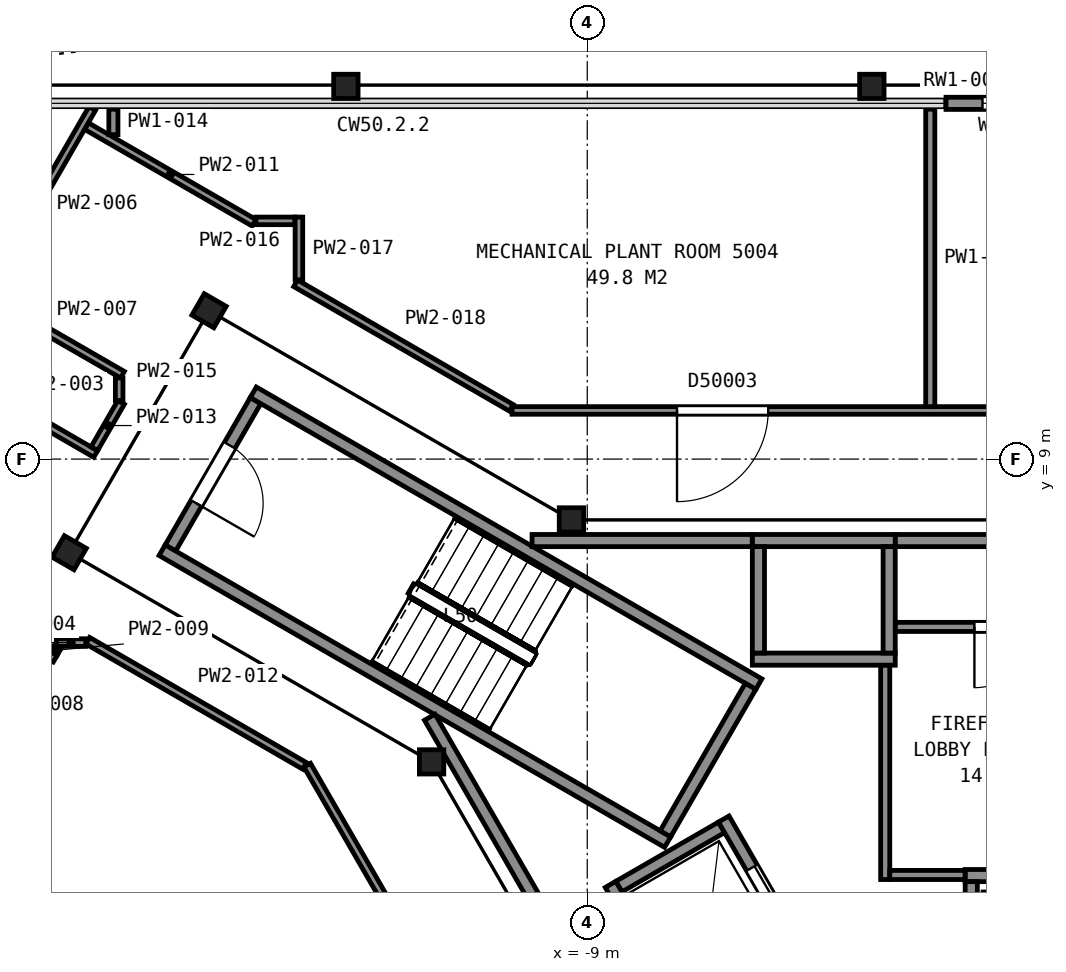
"""IFC4 building model, lengths in metres.
Left out: names, types, materials, properties, quantities, classifications, styles, units other than length and angle.
Written with IfcOpenShell. Run it as: python <this file> out.ifc"""

import sys

from ifc_helpers import new_model, si_unit, direction, frame, frame_2d, origin, origin_2d, place, context, subcontext, project, spatial, rectangle, i_section, extrude, element, fill, save


model = new_model("IFC4")
c1 = context("Model", 3, precision=1e-05, world=origin(), true_north=direction((0.0, 1.0)))
c2 = subcontext(c1, "Body", "Model", "MODEL_VIEW")
j1 = project(units=[si_unit("LENGTHUNIT", "METRE"), si_unit("PLANEANGLEUNIT", "RADIAN")], contexts=[c1])
p1 = place(None, origin())
s1 = spatial("IfcSite", under=j1, at=p1, CompositionType="ELEMENT")
p2 = place(p1, origin())
s2 = spatial("IfcBuilding", under=s1, at=p2, CompositionType="ELEMENT")
p3 = place(p2, frame((0.0, 0.0, 200.6)))
s3 = spatial("IfcBuildingStorey", under=s2, at=p3, CompositionType="ELEMENT", Elevation=200.6)
for number, where, z_axis, x_axis in (
    (1, (-4.32, 15.13, -0.16), (0.0, 0.0, 1.0), (1.0, 0.0, 0.0)),
    (2, (-12.97, 15.13, -0.16), (0.0, 0.0, 1.0), (1.0, 0.0, 0.0)),
):
    element("IfcColumn", number, at=place(p3, frame(where, z_axis=z_axis, x_axis=x_axis)), inside=s3, PredefinedType="COLUMN", context=c2, shape_type="SweptSolid", body=[
        extrude(i_section(OverallWidth=0.401, OverallDepth=0.399, WebThickness=0.025, FlangeThickness=0.04, FilletRadius=0.015, at=origin_2d()), origin(), (0.0, 0.0, 1.0), 5.96),
    ])
p4 = place(p3, frame((-9.26, 8.0, 0.0), z_axis=(0.0, 0.0, 1.0), x_axis=(1.0, 0.0, 0.0)))
e3 = element("IfcColumn", 3, at=p4, inside=s3, PredefinedType="COLUMN", context=c2, shape_type="SweptSolid", body=[
    extrude(i_section(OverallWidth=0.401, OverallDepth=0.399, WebThickness=0.025, FlangeThickness=0.04, FilletRadius=0.015, at=origin_2d()), origin(), (0.0, 0.0, 1.0), 5.8),
])
for number, where, z_axis, x_axis in (
    (4, (-15.22, 11.44, 0.0), (0.0, 0.0, 1.0), (0.5, 0.866, 0.0)),
    (5, (-17.52, 7.46, 0.0), (0.0, 0.0, 1.0), (0.5, 0.866, 0.0)),
):
    element("IfcColumn", number, at=place(p3, frame(where, z_axis=z_axis, x_axis=x_axis)), inside=s3, PredefinedType="COLUMN", context=c2, shape_type="SweptSolid", body=[
        extrude(i_section(OverallWidth=0.406, OverallDepth=0.417, WebThickness=0.03, FlangeThickness=0.048, FilletRadius=0.015, at=origin_2d()), origin(), (0.0, 0.0, 1.0), 5.8),
    ])
p5 = place(p3, frame((-11.56, 4.02, 0.0), z_axis=(0.0, 0.0, 1.0), x_axis=(1.0, 0.0, 0.0)))
e6 = element("IfcColumn", 6, at=p5, inside=s3, PredefinedType="COLUMN", context=c2, shape_type="SweptSolid", body=[
    extrude(i_section(OverallWidth=0.401, OverallDepth=0.399, WebThickness=0.025, FlangeThickness=0.04, FilletRadius=0.015, at=origin_2d()), origin(), (0.0, 0.0, 1.0), 5.8),
])
p6 = place(p3, frame((3.1, 14.851, 0.0), z_axis=(0.0, 0.0, 1.0), x_axis=(-1.0, 0.0, 0.0)))
e7 = element("IfcWall", 7, at=p6, inside=s3, PredefinedType="SOLIDWALL", context=c2, shape_type="SweptSolid", body=[
    extrude(rectangle(XDim=6.2, YDim=0.2, at=frame_2d((3.1, 0.0))), origin(), (0.0, 0.0, 1.0), 4.522),
])
p7 = place(p6, frame((0.6, 0.0, 0.9)))
e8 = element("IfcOpeningElement", 8, at=p7, cuts=e7, PredefinedType="OPENING", context=c2, shape_type="SweptSolid", body=[
    extrude(rectangle(XDim=1.0, YDim=1.5, at=frame_2d((0.5, 0.75))), frame((0.0, 0.11, 0.0), z_axis=(0.0, -1.0, 0.0), x_axis=(1.0, 0.0, 0.0)), (0.0, 0.0, 1.0), 0.22),
])
p8 = place(p6, frame((2.2, 0.0, 0.0)))
e9 = element("IfcOpeningElement", 9, at=p8, cuts=e7, PredefinedType="OPENING", context=c2, shape_type="SweptSolid", body=[
    extrude(rectangle(XDim=1.8, YDim=2.4, at=frame_2d((0.9, 1.2))), frame((0.0, 0.11, 0.0), z_axis=(0.0, -1.0, 0.0), x_axis=(1.0, 0.0, 0.0)), (0.0, 0.0, 1.0), 0.22),
])
p9 = place(p6, frame((4.6, 0.0, 0.9)))
e10 = element("IfcOpeningElement", 10, at=p9, cuts=e7, PredefinedType="OPENING", context=c2, shape_type="SweptSolid", body=[
    extrude(rectangle(XDim=1.0, YDim=1.5, at=frame_2d((0.5, 0.75))), frame((0.0, 0.11, 0.0), z_axis=(0.0, -1.0, 0.0), x_axis=(1.0, 0.0, 0.0)), (0.0, 0.0, 1.0), 0.22),
])
p10 = place(p3, frame((-18.708, 2.701, 0.0), z_axis=(0.0, 0.0, 1.0), x_axis=(0.500009909098, -0.866019682689, 0.0)))
e11 = element("IfcWall", 11, at=p10, inside=s3, PredefinedType="SOLIDWALL", context=c2, shape_type="SweptSolid", body=[
    extrude(rectangle(XDim=6.2, YDim=0.2, at=frame_2d((3.1, 0.0))), origin(), (0.0, 0.0, 1.0), 4.522),
])
p11 = place(p10, frame((0.6, 0.0, 0.9)))
e12 = element("IfcOpeningElement", 12, at=p11, cuts=e11, PredefinedType="OPENING", context=c2, shape_type="SweptSolid", body=[
    extrude(rectangle(XDim=1.0, YDim=1.5, at=frame_2d((0.5, 0.75))), frame((0.0, 0.11, 0.0), z_axis=(0.0, -1.0, 0.0), x_axis=(1.0, 0.0, 0.0)), (0.0, 0.0, 1.0), 0.22),
])
p12 = place(p10, frame((2.2, 0.0, 0.0)))
e13 = element("IfcOpeningElement", 13, at=p12, cuts=e11, PredefinedType="OPENING", context=c2, shape_type="SweptSolid", body=[
    extrude(rectangle(XDim=1.8, YDim=2.4, at=frame_2d((0.9, 1.2))), frame((0.0, 0.11, 0.0), z_axis=(0.0, -1.0, 0.0), x_axis=(1.0, 0.0, 0.0)), (0.0, 0.0, 1.0), 0.22),
])
p13 = place(p10, frame((4.6, 0.0, 0.9)))
e14 = element("IfcOpeningElement", 14, at=p13, cuts=e11, PredefinedType="OPENING", context=c2, shape_type="SweptSolid", body=[
    extrude(rectangle(XDim=1.0, YDim=1.5, at=frame_2d((0.5, 0.75))), frame((0.0, 0.11, 0.0), z_axis=(0.0, -1.0, 0.0), x_axis=(1.0, 0.0, 0.0)), (0.0, 0.0, 1.0), 0.22),
])
p14 = place(p3, frame((-14.455, 9.962, 0.0), z_axis=(0.0, 0.0, 1.0), x_axis=(-0.500049511043, -0.865996816683, 0.0)))
e15 = element("IfcWall", 15, at=p14, inside=s3, PredefinedType="PARTITIONING", context=c2, shape_type="SweptSolid", body=[
    extrude(rectangle(XDim=2.8, YDim=0.2, at=frame_2d((1.4, 0.0))), origin(), (0.0, 0.0, 1.0), 5.55),
])
p15 = place(p14, frame((0.85, 0.0, 0.0)))
e16 = element("IfcOpeningElement", 16, at=p15, cuts=e15, PredefinedType="OPENING", context=c2, shape_type="SweptSolid", body=[
    extrude(rectangle(XDim=1.1, YDim=2.1, at=frame_2d((0.55, 1.05))), frame((0.0, 0.11, 0.0), z_axis=(0.0, -1.0, 0.0), x_axis=(1.0, 0.0, 0.0)), (0.0, 0.0, 1.0), 0.22),
])
for number, where, z_axis, x_axis in (
    (17, (-7.678, 2.701, 0.0), (0.0, 0.0, 1.0), (-0.866, 0.5, 0.0)),
    (18, (-6.178, 5.299, 0.0), (0.0, 0.0, 1.0), (-0.866, 0.5, 0.0)),
):
    element("IfcWall", number, at=place(p3, frame(where, z_axis=z_axis, x_axis=x_axis)), inside=s3, PredefinedType="PARTITIONING", context=c2, shape_type="SweptSolid", body=[
        extrude(rectangle(XDim=9.6, YDim=0.2, at=frame_2d((4.8, 0.0))), origin(), (0.0, 0.0, 1.0), 5.55),
    ])
p16 = place(p3, frame((-6.315, 5.262, 0.0), z_axis=(0.0, 0.0, 1.0), x_axis=(-0.500049511043, -0.865996816683, 0.0)))
e19 = element("IfcWall", 19, at=p16, inside=s3, PredefinedType="PARTITIONING", context=c2, shape_type="SweptSolid", body=[
    extrude(rectangle(XDim=2.8, YDim=0.2, at=frame_2d((1.4, 0.0))), origin(), (0.0, 0.0, 1.0), 5.55),
])
p17 = place(p3, frame((-2.785, 2.15, 0.0), z_axis=(0.0, 0.0, 1.0), x_axis=(1.0, 0.0, 0.0)))
e20 = element("IfcWall", 20, at=p17, inside=s3, PredefinedType="PARTITIONING", context=c2, shape_type="SweptSolid", body=[
    extrude(rectangle(XDim=2.95, YDim=0.2, at=frame_2d((1.475, 0.0))), origin(), (0.0, 0.0, 1.0), 5.8),
])
p18 = place(p17, frame((0.925, 0.0, 0.0)))
e21 = element("IfcOpeningElement", 21, at=p18, cuts=e20, PredefinedType="OPENING", context=c2, shape_type="SweptSolid", body=[
    extrude(rectangle(XDim=1.1, YDim=2.1, at=frame_2d((0.55, 1.05))), frame((0.0, 0.11, 0.0), z_axis=(0.0, -1.0, 0.0), x_axis=(1.0, 0.0, 0.0)), (0.0, 0.0, 1.0), 0.22),
])
for number, where, z_axis, x_axis in (
    (22, (-6.285, 5.71, 0.0), (0.0, 0.0, 1.0), (1.0, 0.0, 0.0)),
    (23, (-6.285, 7.66, 0.0), (0.0, 0.0, 1.0), (1.0, 0.0, 0.0)),
):
    element("IfcWall", number, at=place(p3, frame(where, z_axis=z_axis, x_axis=x_axis)), inside=s3, PredefinedType="PARTITIONING", context=c2, shape_type="SweptSolid", body=[
        extrude(rectangle(XDim=2.35, YDim=0.2, at=frame_2d((1.175, 0.0))), origin(), (0.0, 0.0, 1.0), 5.8),
    ])
for number, where, z_axis, x_axis in (
    (24, (-8.48, 1.969, 0.0), (0.0, 0.0, 1.0), (0.866, 0.5, 0.0)),
    (25, (-2.685, 0.1, 0.0), (0.0, 0.0, 1.0), (0.0, 1.0, 0.0)),
):
    element("IfcWall", number, at=place(p3, frame(where, z_axis=z_axis, x_axis=x_axis)), inside=s3, PredefinedType="PARTITIONING", context=c2, shape_type="SweptSolid", body=[
        extrude(rectangle(XDim=1.95, YDim=0.2, at=frame_2d((0.975, 0.0))), origin(), (0.0, 0.0, 1.0), 5.8),
    ])
for number, where, z_axis, x_axis in (
    (26, (-4.035, 5.81, 0.0), (0.0, 0.0, 1.0), (0.0, 1.0, 0.0)),
    (27, (-6.185, 5.81, 0.0), (0.0, 0.0, 1.0), (0.0, 1.0, 0.0)),
):
    element("IfcWall", number, at=place(p3, frame(where, z_axis=z_axis, x_axis=x_axis)), inside=s3, PredefinedType="PARTITIONING", context=c2, shape_type="SweptSolid", body=[
        extrude(rectangle(XDim=1.75, YDim=0.2, at=frame_2d((0.875, 0.0))), origin(), (0.0, 0.0, 1.0), 5.8),
    ])
p19 = place(p3, frame((-5.28, 0.525, 0.0), z_axis=(0.0, 0.0, 1.0), x_axis=(-0.500037662692, 0.866003658127, 0.0)))
e28 = element("IfcWall", 28, at=p19, inside=s3, PredefinedType="PARTITIONING", context=c2, shape_type="SweptSolid", body=[
    extrude(rectangle(XDim=2.95, YDim=0.2, at=frame_2d((1.475, 0.0))), origin(), (0.0, 0.0, 1.0), 5.8),
])
p20 = place(p19, frame((0.925, 0.0, 0.0)))
e29 = element("IfcOpeningElement", 29, at=p20, cuts=e28, PredefinedType="OPENING", context=c2, shape_type="SweptSolid", body=[
    extrude(rectangle(XDim=1.1, YDim=2.1, at=frame_2d((0.55, 1.05))), frame((0.0, 0.11, 0.0), z_axis=(0.0, -1.0, 0.0), x_axis=(1.0, 0.0, 0.0)), (0.0, 0.0, 1.0), 0.22),
])
p21 = place(p3, frame((-7.242, -0.376, 0.0), z_axis=(0.0, 0.0, 1.0), x_axis=(-0.499996545922, 0.866027397988, 0.0)))
e30 = element("IfcWall", 30, at=p21, inside=s3, PredefinedType="PARTITIONING", context=c2, shape_type="SweptSolid", body=[
    extrude(rectangle(XDim=2.75, YDim=0.2, at=frame_2d((1.375, 0.0))), origin(), (0.0, 0.0, 1.0), 5.8),
])
p22 = place(p3, frame((-11.591, 4.755, 0.0), z_axis=(0.0, 0.0, 1.0), x_axis=(0.500043977787, -0.866000011708, 0.0)))
e31 = element("IfcWall", 31, at=p22, inside=s3, PredefinedType="PARTITIONING", context=c2, shape_type="SweptSolid", body=[
    extrude(rectangle(XDim=6.617, YDim=0.2, at=frame_2d((3.308, 0.0))), origin(), (0.0, 0.0, 1.0), 5.55),
])
p23 = place(p22, frame((3.695, 0.0, 0.0)))
e32 = element("IfcOpeningElement", 32, at=p23, cuts=e31, PredefinedType="OPENING", context=c2, shape_type="SweptSolid", body=[
    extrude(rectangle(XDim=1.8, YDim=2.1, at=frame_2d((0.9, 1.05))), frame((0.0, 0.11, 0.0), z_axis=(0.0, -1.0, 0.0), x_axis=(1.0, 0.0, 0.0)), (0.0, 0.0, 1.0), 0.22),
])
p24 = place(p3, frame((-9.908, 7.66, 0.0), z_axis=(0.0, 0.0, 1.0), x_axis=(1.0, 0.0, 0.0)))
e33 = element("IfcWall", 33, at=p24, inside=s3, PredefinedType="PARTITIONING", context=c2, shape_type="SweptSolid", body=[
    extrude(rectangle(XDim=3.621, YDim=0.2, at=frame_2d((1.811, 0.0))), origin(), (0.0, 0.0, 1.0), 5.55),
])
p25 = place(p3, frame((-4.1, 2.085, 0.0), z_axis=(0.0, 0.0, 1.0), x_axis=(0.0, 1.0, 0.0)))
e34 = element("IfcWall", 34, at=p25, inside=s3, PredefinedType="PARTITIONING", context=c2, shape_type="SweptSolid", body=[
    extrude(rectangle(XDim=3.523, YDim=0.15, at=frame_2d((1.761, 0.0))), origin(), (0.0, 0.0, 1.0), 5.55),
])
p26 = place(p3, frame((-4.025, 2.16, 0.0), z_axis=(0.0, 0.0, 1.0), x_axis=(1.0, 0.0, 0.0)))
e35 = element("IfcWall", 35, at=p26, inside=s3, PredefinedType="PARTITIONING", context=c2, shape_type="SweptSolid", body=[
    extrude(rectangle(XDim=1.238, YDim=0.15, at=frame_2d((0.619, 0.0))), origin(), (0.0, 0.0, 1.0), 5.55),
])
p27 = place(p3, frame((-3.933, 6.24, 0.0), z_axis=(0.0, 0.0, 1.0), x_axis=(1.0, 0.0, 0.0)))
e36 = element("IfcWall", 36, at=p27, inside=s3, PredefinedType="PARTITIONING", context=c2, shape_type="SweptSolid", body=[
    extrude(rectangle(XDim=3.538, YDim=0.15, at=frame_2d((1.769, 0.0))), origin(), (0.0, 0.0, 1.0), 5.55),
])
p28 = place(p27, frame((1.3, 0.0, 0.0)))
e37 = element("IfcOpeningElement", 37, at=p28, cuts=e36, PredefinedType="OPENING", context=c2, shape_type="SweptSolid", body=[
    extrude(rectangle(XDim=1.0, YDim=2.1, at=frame_2d((0.5, 1.05))), frame((0.0, 0.085, 0.0), z_axis=(0.0, -1.0, 0.0), x_axis=(1.0, 0.0, 0.0)), (0.0, 0.0, 1.0), 0.17),
])
p29 = place(p3, frame((-3.933, 7.66, 0.0), z_axis=(0.0, 0.0, 1.0), x_axis=(1.0, 0.0, 0.0)))
e38 = element("IfcWall", 38, at=p29, inside=s3, PredefinedType="PARTITIONING", context=c2, shape_type="SweptSolid", body=[
    extrude(rectangle(XDim=13.841, YDim=0.2, at=frame_2d((6.92, 0.0))), origin(), (0.0, 0.0, 1.0), 5.55),
])
p30 = place(p3, frame((-19.528, 10.498, 0.0), z_axis=(0.0, 0.0, 1.0), x_axis=(0.865499315081, -0.500910107299, 0.0)))
e39 = element("IfcWall", 39, at=p30, inside=s3, PredefinedType="PARTITIONING", context=c2, shape_type="SweptSolid", body=[
    extrude(rectangle(XDim=2.823, YDim=0.125, at=frame_2d((1.411, 0.0))), origin(), (0.0, 0.0, 1.0), 4.462),
])
p31 = place(p3, frame((-18.943, 11.641, 0.0), z_axis=(0.0, 0.0, 1.0), x_axis=(0.499517355343, 0.866303879543, 0.0)))
e40 = element("IfcWall", 40, at=p31, inside=s3, PredefinedType="PARTITIONING", context=c2, shape_type="SweptSolid", body=[
    extrude(rectangle(XDim=3.607, YDim=0.125, at=frame_2d((1.803, 0.0))), origin(), (0.0, 0.0, 1.0), 4.462),
])
p32 = place(p3, frame((-18.856, 11.663, 0.0), z_axis=(0.0, 0.0, 1.0), x_axis=(0.866389293917, -0.499369193469, 0.0)))
e41 = element("IfcWall", 41, at=p32, inside=s3, PredefinedType="PARTITIONING", context=c2, shape_type="SweptSolid", body=[
    extrude(rectangle(XDim=2.553, YDim=0.125, at=frame_2d((1.276, 0.0))), origin(), (0.0, 0.0, 1.0), 4.462),
])
p33 = place(p3, frame((-18.135, 5.939, 0.0), z_axis=(0.0, 0.0, 1.0), x_axis=(0.865150363836, -0.501512560116, 0.0)))
e42 = element("IfcWall", 42, at=p33, inside=s3, PredefinedType="PARTITIONING", context=c2, shape_type="SweptSolid", body=[
    extrude(rectangle(XDim=0.444, YDim=0.125, at=frame_2d((0.222, 0.0))), origin(), (0.0, 0.0, 1.0), 4.462),
])
p34 = place(p3, frame((-17.771, 5.804, 0.0), z_axis=(0.0, 0.0, 1.0), x_axis=(0.499195341736, 0.86648947529, 0.0)))
e43 = element("IfcWall", 43, at=p34, inside=s3, PredefinedType="PARTITIONING", context=c2, shape_type="SweptSolid", body=[
    extrude(rectangle(XDim=0.12, YDim=0.125, at=frame_2d((0.06, 0.0))), origin(), (0.0, 0.0, 1.0), 4.462),
])
p35 = place(p3, frame((-17.731, 5.982, 0.0), z_axis=(0.0, 0.0, 1.0), x_axis=(1.0, 0.0, 0.0)))
e44 = element("IfcWall", 44, at=p35, inside=s3, PredefinedType="PARTITIONING", context=c2, shape_type="SweptSolid", body=[
    extrude(rectangle(XDim=0.485, YDim=0.125, at=frame_2d((0.243, 0.0))), origin(), (0.0, 0.0, 1.0), 4.462),
])
p36 = place(p3, frame((-17.234, 14.476, 0.0), z_axis=(0.0, 0.0, 1.0), x_axis=(0.866156179635, -0.499773421142, 0.0)))
e45 = element("IfcWall", 45, at=p36, inside=s3, PredefinedType="PARTITIONING", context=c2, shape_type="SweptSolid", body=[
    extrude(rectangle(XDim=3.179, YDim=0.125, at=frame_2d((1.59, 0.0))), origin(), (0.0, 0.0, 1.0), 4.462),
])
p37 = place(p3, frame((-17.215, 6.013, 0.0), z_axis=(0.0, 0.0, 1.0), x_axis=(0.866031617834, -0.499989236795, 0.0)))
e46 = element("IfcWall", 46, at=p37, inside=s3, PredefinedType="PARTITIONING", context=c2, shape_type="SweptSolid", body=[
    extrude(rectangle(XDim=4.119, YDim=0.125, at=frame_2d((2.06, 0.0))), origin(), (0.0, 0.0, 1.0), 4.462),
])
p38 = place(p3, frame((-17.106, 9.171, 0.0), z_axis=(0.0, 0.0, 1.0), x_axis=(0.500411837378, 0.865787498762, 0.0)))
e47 = element("IfcWall", 47, at=p38, inside=s3, PredefinedType="PARTITIONING", context=c2, shape_type="SweptSolid", body=[
    extrude(rectangle(XDim=0.879, YDim=0.125, at=frame_2d((0.439, 0.0))), origin(), (0.0, 0.0, 1.0), 4.462),
])
p39 = place(p3, frame((-16.793, 14.336, 0.0), z_axis=(0.0, 0.0, 1.0), x_axis=(0.0, 1.0, 0.0)))
e48 = element("IfcWall", 48, at=p39, inside=s3, PredefinedType="PARTITIONING", context=c2, shape_type="SweptSolid", body=[
    extrude(rectangle(XDim=0.418, YDim=0.15, at=frame_2d((0.209, 0.0))), origin(), (0.0, 0.0, 1.0), 4.462),
])
p40 = place(p3, frame((-16.698, 9.963, 0.0), z_axis=(0.0, 0.0, 1.0), x_axis=(0.0, 1.0, 0.0)))
e49 = element("IfcWall", 49, at=p40, inside=s3, PredefinedType="PARTITIONING", context=c2, shape_type="SweptSolid", body=[
    extrude(rectangle(XDim=0.371, YDim=0.125, at=frame_2d((0.186, 0.0))), origin(), (0.0, 0.0, 1.0), 4.462),
])
p41 = place(p3, frame((-14.449, 12.918, 0.0), z_axis=(0.0, 0.0, 1.0), x_axis=(1.0, 0.0, 0.0)))
e50 = element("IfcWall", 50, at=p41, inside=s3, PredefinedType="PARTITIONING", context=c2, shape_type="SweptSolid", body=[
    extrude(rectangle(XDim=0.642, YDim=0.125, at=frame_2d((0.321, 0.0))), origin(), (0.0, 0.0, 1.0), 4.462),
])
p42 = place(p3, frame((-13.742, 11.945, 0.0), z_axis=(0.0, 0.0, 1.0), x_axis=(0.0, 1.0, 0.0)))
e51 = element("IfcWall", 51, at=p42, inside=s3, PredefinedType="PARTITIONING", context=c2, shape_type="SweptSolid", body=[
    extrude(rectangle(XDim=1.035, YDim=0.125, at=frame_2d((0.518, 0.0))), origin(), (0.0, 0.0, 1.0), 4.462),
])
p43 = place(p3, frame((-13.796, 11.891, 0.0), z_axis=(0.0, 0.0, 1.0), x_axis=(0.866019886808, -0.500009555562, 0.0)))
e52 = element("IfcWall", 52, at=p43, inside=s3, PredefinedType="PARTITIONING", context=c2, shape_type="SweptSolid", body=[
    extrude(rectangle(XDim=4.098, YDim=0.125, at=frame_2d((2.049, 0.0))), origin(), (0.0, 0.0, 1.0), 4.462),
])
p44 = place(p3, frame((-3.901, -12.844, 0.0), z_axis=(0.0, 0.0, 1.0), x_axis=(-0.499989213553, 0.866031631253, 0.0)))
e53 = element("IfcWall", 53, at=p44, inside=s3, PredefinedType="PARTITIONING", context=c2, shape_type="SweptSolid", body=[
    extrude(rectangle(XDim=19.41, YDim=0.125, at=frame_2d((9.705, 0.0))), origin(), (0.0, 0.0, 1.0), 4.462),
])
p45 = place(p44, frame((13.497, 0.0, 0.0)))
e54 = element("IfcOpeningElement", 54, at=p45, cuts=e53, PredefinedType="OPENING", context=c2, shape_type="SweptSolid", body=[
    extrude(rectangle(XDim=1.5, YDim=2.1, at=frame_2d((0.75, 1.05))), frame((0.0, 0.073, 0.0), z_axis=(0.0, -1.0, 0.0), x_axis=(1.0, 0.0, 0.0)), (0.0, 0.0, 1.0), 0.145),
])
p46 = place(p44, frame((3.873, 0.0, 0.0)))
e55 = element("IfcOpeningElement", 55, at=p46, cuts=e53, PredefinedType="OPENING", context=c2, shape_type="SweptSolid", body=[
    extrude(rectangle(XDim=1.5, YDim=2.1, at=frame_2d((0.75, 1.05))), frame((0.0, 0.073, 0.0), z_axis=(0.0, -1.0, 0.0), x_axis=(1.0, 0.0, 0.0)), (0.0, 0.0, 1.0), 0.145),
])
p47 = place(p3, frame((-10.237, 9.8, 0.0), z_axis=(0.0, 0.0, 1.0), x_axis=(1.0, 0.0, 0.0)))
e56 = element("IfcWall", 56, at=p47, inside=s3, PredefinedType="PARTITIONING", context=c2, shape_type="SweptSolid", body=[
    extrude(rectangle(XDim=20.473, YDim=0.125, at=frame_2d((10.237, 0.0))), origin(), (0.0, 0.0, 1.0), 4.462),
])
p48 = place(p47, frame((16.246, 0.0, 0.0)))
e57 = element("IfcOpeningElement", 57, at=p48, cuts=e56, PredefinedType="OPENING", context=c2, shape_type="SweptSolid", body=[
    extrude(rectangle(XDim=1.5, YDim=2.1, at=frame_2d((0.75, 1.05))), frame((0.0, 0.073, 0.0), z_axis=(0.0, -1.0, 0.0), x_axis=(1.0, 0.0, 0.0)), (0.0, 0.0, 1.0), 0.145),
])
p49 = place(p47, frame((9.627, 0.0, 0.0)))
e58 = element("IfcOpeningElement", 58, at=p49, cuts=e56, PredefinedType="OPENING", context=c2, shape_type="SweptSolid", body=[
    extrude(rectangle(XDim=1.2, YDim=2.1, at=frame_2d((0.6, 1.05))), frame((0.0, 0.073, 0.0), z_axis=(0.0, -1.0, 0.0), x_axis=(1.0, 0.0, 0.0)), (0.0, 0.0, 1.0), 0.145),
])
p50 = place(p47, frame((2.712, 0.0, 0.0)))
e59 = element("IfcOpeningElement", 59, at=p50, cuts=e56, PredefinedType="OPENING", context=c2, shape_type="SweptSolid", body=[
    extrude(rectangle(XDim=1.5, YDim=2.1, at=frame_2d((0.75, 1.05))), frame((0.0, 0.073, 0.0), z_axis=(0.0, -1.0, 0.0), x_axis=(1.0, 0.0, 0.0)), (0.0, 0.0, 1.0), 0.145),
])
p51 = place(p3, frame((-3.359, 9.863, 0.0), z_axis=(0.0, 0.0, 1.0), x_axis=(0.0, 1.0, 0.0)))
e60 = element("IfcWall", 60, at=p51, inside=s3, PredefinedType="PARTITIONING", context=c2, shape_type="SweptSolid", body=[
    extrude(rectangle(XDim=4.892, YDim=0.15, at=frame_2d((2.446, 0.0))), origin(), (0.0, 0.0, 1.0), 4.462),
])
p52 = place(p9, origin())
e61 = element("IfcWindow", 61, at=p52, inside=s3, PartitioningType="SINGLE_PANEL", PredefinedType="WINDOW", context=c2, shape_type="SweptSolid", body=[
    extrude(rectangle(XDim=1.0, YDim=1.5, at=frame_2d((0.5, 0.75))), frame((0.0, 0.03, 0.0), z_axis=(0.0, -1.0, 0.0), x_axis=(1.0, 0.0, 0.0)), (0.0, 0.0, 1.0), 0.06),
])
fill(e10, e61)
p53 = place(p15, origin())
e62 = element("IfcDoor", 62, at=p53, inside=s3, OperationType="SINGLE_SWING_RIGHT", PredefinedType="DOOR", context=c2, shape_type="SweptSolid", body=[
    extrude(rectangle(XDim=1.1, YDim=2.1, at=frame_2d((0.55, 1.05))), frame((0.0, 0.025, 0.0), z_axis=(0.0, -1.0, 0.0), x_axis=(1.0, 0.0, 0.0)), (0.0, 0.0, 1.0), 0.05),
])
fill(e16, e62)
p54 = place(p20, origin())
e63 = element("IfcDoor", 63, at=p54, inside=s3, OperationType="SLIDING_TO_LEFT", PredefinedType="DOOR", context=c2, shape_type="SweptSolid", body=[
    extrude(rectangle(XDim=1.1, YDim=2.1, at=frame_2d((0.55, 1.05))), frame((0.0, 0.025, 0.0), z_axis=(0.0, -1.0, 0.0), x_axis=(1.0, 0.0, 0.0)), (0.0, 0.0, 1.0), 0.05),
])
fill(e29, e63)
p55 = place(p28, origin())
e64 = element("IfcDoor", 64, at=p55, inside=s3, OperationType="SINGLE_SWING_LEFT", PredefinedType="DOOR", context=c2, shape_type="SweptSolid", body=[
    extrude(rectangle(XDim=1.0, YDim=2.1, at=frame_2d((0.5, 1.05))), frame((0.0, 0.025, 0.0), z_axis=(0.0, -1.0, 0.0), x_axis=(1.0, 0.0, 0.0)), (0.0, 0.0, 1.0), 0.05),
])
fill(e37, e64)
p56 = place(p50, origin())
e65 = element("IfcDoor", 65, at=p56, inside=s3, OperationType="DOUBLE_DOOR_SINGLE_SWING", PredefinedType="DOOR", context=c2, shape_type="SweptSolid", body=[
    extrude(rectangle(XDim=1.5, YDim=2.1, at=frame_2d((0.75, 1.05))), frame((0.0, 0.025, 0.0), z_axis=(0.0, -1.0, 0.0), x_axis=(1.0, 0.0, 0.0)), (0.0, 0.0, 1.0), 0.05),
])
fill(e59, e65)
save(model, sys.argv[1])
